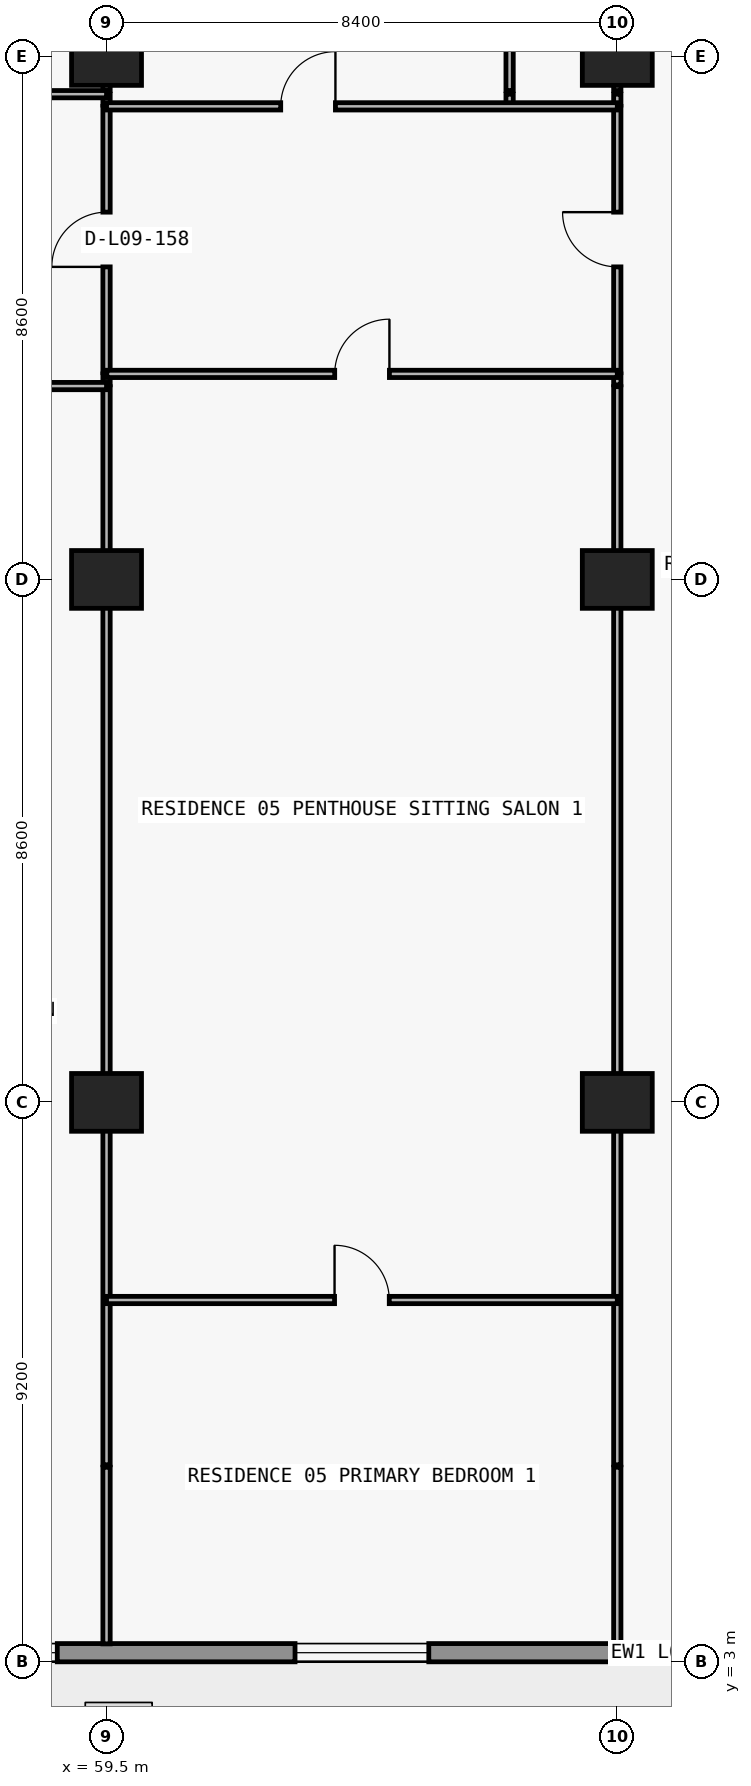
"""IFC4 building model, lengths in metres.
Left out: names, types, materials, properties, quantities, classifications, styles, units other than length and angle.
Written with IfcOpenShell. Run it as: python <this file> out.ifc"""

import sys

from ifc_helpers import new_model, si_unit, direction, frame, frame_2d, origin, origin_2d, place, context, subcontext, project, spatial, rectangle, extrude, element, fill, save


model = new_model("IFC4")
c1 = context("Model", 3, precision=1e-05, world=origin(), true_north=direction((0.0, 1.0)))
c2 = subcontext(c1, "Body", "Model", "MODEL_VIEW")
j1 = project(units=[si_unit("LENGTHUNIT", "METRE"), si_unit("PLANEANGLEUNIT", "RADIAN")], contexts=[c1])
p1 = place(None, origin())
s1 = spatial("IfcSite", under=j1, at=p1, CompositionType="ELEMENT")
p2 = place(p1, origin())
s2 = spatial("IfcBuilding", under=s1, at=p2, CompositionType="ELEMENT")
p3 = place(p2, frame((0.0, 0.0, 39.9)))
s3 = spatial("IfcBuildingStorey", under=s2, at=p3, CompositionType="ELEMENT", Elevation=39.9)
for number, where, z_axis, x_axis in (
    (1, (59.5, 12.2, 0.0), (0.0, 0.0, 1.0), (1.0, 0.0, 0.0)),
    (2, (67.9, 12.2, 0.0), (0.0, 0.0, 1.0), (1.0, 0.0, 0.0)),
    (3, (59.5, 20.8, 0.0), (0.0, 0.0, 1.0), (1.0, 0.0, 0.0)),
    (4, (67.9, 20.8, 0.0), (0.0, 0.0, 1.0), (1.0, 0.0, 0.0)),
    (5, (59.5, 29.4, 0.0), (0.0, 0.0, 1.0), (1.0, 0.0, 0.0)),
    (6, (67.9, 29.4, 0.0), (0.0, 0.0, 1.0), (1.0, 0.0, 0.0)),
):
    element("IfcColumn", number, at=place(p3, frame(where, z_axis=z_axis, x_axis=x_axis)), inside=s3, PredefinedType="COLUMN", context=c2, shape_type="SweptSolid", body=[
        extrude(rectangle(XDim=1.15, YDim=0.95, at=origin_2d()), origin(), (0.0, 0.0, 1.0), 3.05),
    ])
p4 = place(p3, frame((72.7, 3.15, 0.0), z_axis=(0.0, 0.0, 1.0), x_axis=(-1.0, 0.0, 0.0)))
e7 = element("IfcWall", 7, at=p4, inside=s3, PredefinedType="STANDARD", context=c2, shape_type="SweptSolid", body=[
    extrude(rectangle(XDim=67.6, YDim=0.3, at=frame_2d((33.8, 0.0))), origin(), (0.0, 0.0, 1.0), 3.05),
])
p5 = place(p4, frame((59.89, 0.0, 0.0)))
e8 = element("IfcOpeningElement", 8, at=p5, cuts=e7, PredefinedType="OPENING", context=c2, shape_type="SweptSolid", body=[
    extrude(rectangle(XDim=2.0, YDim=2.3, at=frame_2d((1.0, 1.15))), frame((0.0, 0.16, 0.0), z_axis=(0.0, -1.0, 0.0), x_axis=(1.0, 0.0, 0.0)), (0.0, 0.0, 1.0), 0.32),
])
p6 = place(p4, frame((55.21, 0.0, 0.65)))
e9 = element("IfcOpeningElement", 9, at=p6, cuts=e7, PredefinedType="OPENING", context=c2, shape_type="SweptSolid", body=[
    extrude(rectangle(XDim=2.6, YDim=1.85, at=frame_2d((1.3, 0.925))), frame((0.0, 0.16, 0.0), z_axis=(0.0, -1.0, 0.0), x_axis=(1.0, 0.0, 0.0)), (0.0, 0.0, 1.0), 0.32),
])
p7 = place(p4, frame((49.1, 0.0, 0.85)))
e10 = element("IfcOpeningElement", 10, at=p7, cuts=e7, PredefinedType="OPENING", context=c2, shape_type="SweptSolid", body=[
    extrude(rectangle(XDim=2.2, YDim=1.55, at=frame_2d((1.1, 0.775))), frame((0.0, 0.16, 0.0), z_axis=(0.0, -1.0, 0.0), x_axis=(1.0, 0.0, 0.0)), (0.0, 0.0, 1.0), 0.32),
])
p8 = place(p4, frame((42.69, 0.0, 0.0)))
e11 = element("IfcOpeningElement", 11, at=p8, cuts=e7, PredefinedType="OPENING", context=c2, shape_type="SweptSolid", body=[
    extrude(rectangle(XDim=2.0, YDim=2.3, at=frame_2d((1.0, 1.15))), frame((0.0, 0.16, 0.0), z_axis=(0.0, -1.0, 0.0), x_axis=(1.0, 0.0, 0.0)), (0.0, 0.0, 1.0), 0.32),
])
p9 = place(p4, frame((38.59, 0.0, 0.85)))
e12 = element("IfcOpeningElement", 12, at=p9, cuts=e7, PredefinedType="OPENING", context=c2, shape_type="SweptSolid", body=[
    extrude(rectangle(XDim=1.8, YDim=1.55, at=frame_2d((0.9, 0.775))), frame((0.0, 0.16, 0.0), z_axis=(0.0, -1.0, 0.0), x_axis=(1.0, 0.0, 0.0)), (0.0, 0.0, 1.0), 0.32),
])
p10 = place(p4, frame((30.914, 0.0, 0.85)))
e13 = element("IfcOpeningElement", 13, at=p10, cuts=e7, PredefinedType="OPENING", context=c2, shape_type="SweptSolid", body=[
    extrude(rectangle(XDim=2.2, YDim=1.55, at=frame_2d((1.1, 0.775))), frame((0.0, 0.16, 0.0), z_axis=(0.0, -1.0, 0.0), x_axis=(1.0, 0.0, 0.0)), (0.0, 0.0, 1.0), 0.32),
])
p11 = place(p4, frame((26.69, 0.0, 0.0)))
e14 = element("IfcOpeningElement", 14, at=p11, cuts=e7, PredefinedType="OPENING", context=c2, shape_type="SweptSolid", body=[
    extrude(rectangle(XDim=2.0, YDim=2.3, at=frame_2d((1.0, 1.15))), frame((0.0, 0.16, 0.0), z_axis=(0.0, -1.0, 0.0), x_axis=(1.0, 0.0, 0.0)), (0.0, 0.0, 1.0), 0.32),
])
p12 = place(p4, frame((22.59, 0.0, 0.85)))
e15 = element("IfcOpeningElement", 15, at=p12, cuts=e7, PredefinedType="OPENING", context=c2, shape_type="SweptSolid", body=[
    extrude(rectangle(XDim=1.8, YDim=1.55, at=frame_2d((0.9, 0.775))), frame((0.0, 0.16, 0.0), z_axis=(0.0, -1.0, 0.0), x_axis=(1.0, 0.0, 0.0)), (0.0, 0.0, 1.0), 0.32),
])
p13 = place(p4, frame((18.69, 0.0, 0.0)))
e16 = element("IfcOpeningElement", 16, at=p13, cuts=e7, PredefinedType="OPENING", context=c2, shape_type="SweptSolid", body=[
    extrude(rectangle(XDim=2.0, YDim=2.3, at=frame_2d((1.0, 1.15))), frame((0.0, 0.16, 0.0), z_axis=(0.0, -1.0, 0.0), x_axis=(1.0, 0.0, 0.0)), (0.0, 0.0, 1.0), 0.32),
])
p14 = place(p4, frame((14.01, 0.0, 0.65)))
e17 = element("IfcOpeningElement", 17, at=p14, cuts=e7, PredefinedType="OPENING", context=c2, shape_type="SweptSolid", body=[
    extrude(rectangle(XDim=2.6, YDim=1.85, at=frame_2d((1.3, 0.925))), frame((0.0, 0.16, 0.0), z_axis=(0.0, -1.0, 0.0), x_axis=(1.0, 0.0, 0.0)), (0.0, 0.0, 1.0), 0.32),
])
p15 = place(p4, frame((7.9, 0.0, 0.85)))
e18 = element("IfcOpeningElement", 18, at=p15, cuts=e7, PredefinedType="OPENING", context=c2, shape_type="SweptSolid", body=[
    extrude(rectangle(XDim=2.2, YDim=1.55, at=frame_2d((1.1, 0.775))), frame((0.0, 0.16, 0.0), z_axis=(0.0, -1.0, 0.0), x_axis=(1.0, 0.0, 0.0)), (0.0, 0.0, 1.0), 0.32),
])
p16 = place(p3, frame((59.5, 3.295, 0.0), z_axis=(0.0, 0.0, 1.0), x_axis=(0.0, 1.0, 0.0)))
e19 = element("IfcWall", 19, at=p16, inside=s3, PredefinedType="PARTITIONING", context=c2, shape_type="SweptSolid", body=[
    extrude(rectangle(XDim=2.905, YDim=0.12, at=frame_2d((1.453, 0.0))), origin(), (0.0, 0.0, 1.0), 3.05),
])
p17 = place(p3, frame((59.5, 6.24, 0.0), z_axis=(0.0, 0.0, 1.0), x_axis=(0.0, 1.0, 0.0)))
e20 = element("IfcWall", 20, at=p17, inside=s3, PredefinedType="PARTITIONING", context=c2, shape_type="SweptSolid", body=[
    extrude(rectangle(XDim=17.73, YDim=0.12, at=frame_2d((8.865, 0.0))), origin(), (0.0, 0.0, 1.0), 2.11),
])
p18 = place(p3, frame((59.5, 24.0, 0.0), z_axis=(0.0, 0.0, 1.0), x_axis=(0.0, 1.0, 0.0)))
e21 = element("IfcWall", 21, at=p18, inside=s3, PredefinedType="PARTITIONING", context=c2, shape_type="SweptSolid", body=[
    extrude(rectangle(XDim=0.18, YDim=0.12, at=frame_2d((0.09, 0.0))), origin(), (0.0, 0.0, 1.0), 2.11),
])
p19 = place(p3, frame((59.5, 24.2, 0.0), z_axis=(0.0, 0.0, 1.0), x_axis=(0.0, 1.0, 0.0)))
e22 = element("IfcWall", 22, at=p19, inside=s3, PredefinedType="PARTITIONING", context=c2, shape_type="SweptSolid", body=[
    extrude(rectangle(XDim=4.38, YDim=0.12, at=frame_2d((2.19, 0.0))), origin(), (0.0, 0.0, 1.0), 2.11),
])
p20 = place(p19, frame((1.74, 0.0, 0.0)))
e23 = element("IfcOpeningElement", 23, at=p20, cuts=e22, PredefinedType="OPENING", context=c2, shape_type="SweptSolid", body=[
    extrude(rectangle(XDim=0.9, YDim=2.06, at=frame_2d((0.45, 1.03))), frame((0.0, 0.07, 0.0), z_axis=(0.0, -1.0, 0.0), x_axis=(1.0, 0.0, 0.0)), (0.0, 0.0, 1.0), 0.14),
])
p21 = place(p3, frame((59.5, 28.6, 0.0), z_axis=(0.0, 0.0, 1.0), x_axis=(0.0, 1.0, 0.0)))
e24 = element("IfcWall", 24, at=p21, inside=s3, PredefinedType="PARTITIONING", context=c2, shape_type="SweptSolid", body=[
    extrude(rectangle(XDim=0.18, YDim=0.12, at=frame_2d((0.09, 0.0))), origin(), (0.0, 0.0, 1.0), 2.11),
])
p22 = place(p3, frame((59.5, 28.84, 0.0), z_axis=(0.0, 0.0, 1.0), x_axis=(0.0, 1.0, 0.0)))
e25 = element("IfcWall", 25, at=p22, inside=s3, PredefinedType="PARTITIONING", context=c2, shape_type="SweptSolid", body=[
    extrude(rectangle(XDim=5.16, YDim=0.12, at=frame_2d((2.58, 0.0))), origin(), (0.0, 0.0, 1.0), 2.11),
])
p23 = place(p3, frame((66.129, 28.6, 0.0), z_axis=(0.0, 0.0, 1.0), x_axis=(0.0, 1.0, 0.0)))
e26 = element("IfcWall", 26, at=p23, inside=s3, PredefinedType="PARTITIONING", context=c2, shape_type="SweptSolid", body=[
    extrude(rectangle(XDim=0.18, YDim=0.12, at=frame_2d((0.09, 0.0))), origin(), (0.0, 0.0, 1.0), 3.05),
])
p24 = place(p3, frame((66.129, 28.84, 0.0), z_axis=(0.0, 0.0, 1.0), x_axis=(0.0, 1.0, 0.0)))
e27 = element("IfcWall", 27, at=p24, inside=s3, PredefinedType="PARTITIONING", context=c2, shape_type="SweptSolid", body=[
    extrude(rectangle(XDim=5.16, YDim=0.12, at=frame_2d((2.58, 0.0))), origin(), (0.0, 0.0, 1.0), 3.05),
])
p25 = place(p24, frame((2.155, 0.0, 0.0)))
e28 = element("IfcOpeningElement", 28, at=p25, cuts=e27, PredefinedType="OPENING", context=c2, shape_type="SweptSolid", body=[
    extrude(rectangle(XDim=0.85, YDim=2.1, at=frame_2d((0.425, 1.05))), frame((0.0, 0.07, 0.0), z_axis=(0.0, -1.0, 0.0), x_axis=(1.0, 0.0, 0.0)), (0.0, 0.0, 1.0), 0.14),
])
p26 = place(p3, frame((67.9, 3.295, 0.0), z_axis=(0.0, 0.0, 1.0), x_axis=(0.0, 1.0, 0.0)))
e29 = element("IfcWall", 29, at=p26, inside=s3, PredefinedType="PARTITIONING", context=c2, shape_type="SweptSolid", body=[
    extrude(rectangle(XDim=2.905, YDim=0.12, at=frame_2d((1.453, 0.0))), origin(), (0.0, 0.0, 1.0), 3.05),
])
p27 = place(p3, frame((67.9, 6.24, 0.0), z_axis=(0.0, 0.0, 1.0), x_axis=(0.0, 1.0, 0.0)))
e30 = element("IfcWall", 30, at=p27, inside=s3, PredefinedType="PARTITIONING", context=c2, shape_type="SweptSolid", body=[
    extrude(rectangle(XDim=17.73, YDim=0.12, at=frame_2d((8.865, 0.0))), origin(), (0.0, 0.0, 1.0), 2.11),
])
p28 = place(p3, frame((67.9, 24.0, 0.0), z_axis=(0.0, 0.0, 1.0), x_axis=(0.0, 1.0, 0.0)))
e31 = element("IfcWall", 31, at=p28, inside=s3, PredefinedType="PARTITIONING", context=c2, shape_type="SweptSolid", body=[
    extrude(rectangle(XDim=0.18, YDim=0.12, at=frame_2d((0.09, 0.0))), origin(), (0.0, 0.0, 1.0), 2.11),
])
p29 = place(p3, frame((67.9, 24.2, 0.0), z_axis=(0.0, 0.0, 1.0), x_axis=(0.0, 1.0, 0.0)))
e32 = element("IfcWall", 32, at=p29, inside=s3, PredefinedType="PARTITIONING", context=c2, shape_type="SweptSolid", body=[
    extrude(rectangle(XDim=4.38, YDim=0.12, at=frame_2d((2.19, 0.0))), origin(), (0.0, 0.0, 1.0), 2.11),
])
p30 = place(p29, frame((1.74, 0.0, 0.0)))
e33 = element("IfcOpeningElement", 33, at=p30, cuts=e32, PredefinedType="OPENING", context=c2, shape_type="SweptSolid", body=[
    extrude(rectangle(XDim=0.9, YDim=2.06, at=frame_2d((0.45, 1.03))), frame((0.0, 0.07, 0.0), z_axis=(0.0, -1.0, 0.0), x_axis=(1.0, 0.0, 0.0)), (0.0, 0.0, 1.0), 0.14),
])
p31 = place(p3, frame((67.9, 28.6, 0.0), z_axis=(0.0, 0.0, 1.0), x_axis=(0.0, 1.0, 0.0)))
e34 = element("IfcWall", 34, at=p31, inside=s3, PredefinedType="PARTITIONING", context=c2, shape_type="SweptSolid", body=[
    extrude(rectangle(XDim=0.18, YDim=0.12, at=frame_2d((0.09, 0.0))), origin(), (0.0, 0.0, 1.0), 2.11),
])
p32 = place(p3, frame((67.9, 28.84, 0.0), z_axis=(0.0, 0.0, 1.0), x_axis=(0.0, 1.0, 0.0)))
e35 = element("IfcWall", 35, at=p32, inside=s3, PredefinedType="PARTITIONING", context=c2, shape_type="SweptSolid", body=[
    extrude(rectangle(XDim=5.16, YDim=0.12, at=frame_2d((2.58, 0.0))), origin(), (0.0, 0.0, 1.0), 2.11),
])
p33 = place(p3, frame((59.5, 8.95, 0.0), z_axis=(0.0, 0.0, 1.0), x_axis=(1.0, 0.0, 0.0)))
e36 = element("IfcWall", 36, at=p33, inside=s3, PredefinedType="PARTITIONING", context=c2, shape_type="SweptSolid", body=[
    extrude(rectangle(XDim=8.4, YDim=0.12, at=frame_2d((4.2, 0.0))), origin(), (0.0, 0.0, 1.0), 3.05),
])
p34 = place(p33, frame((3.75, 0.0, 0.0)))
e37 = element("IfcOpeningElement", 37, at=p34, cuts=e36, PredefinedType="OPENING", context=c2, shape_type="SweptSolid", body=[
    extrude(rectangle(XDim=0.9, YDim=2.15, at=frame_2d((0.45, 1.075))), frame((0.0, 0.07, 0.0), z_axis=(0.0, -1.0, 0.0), x_axis=(1.0, 0.0, 0.0)), (0.0, 0.0, 1.0), 0.14),
])
p35 = place(p3, frame((51.37, 23.98, 0.0), z_axis=(0.0, 0.0, 1.0), x_axis=(1.0, 0.0, 0.0)))
e38 = element("IfcWall", 38, at=p35, inside=s3, PredefinedType="PARTITIONING", context=c2, shape_type="SweptSolid", body=[
    extrude(rectangle(XDim=8.13, YDim=0.12, at=frame_2d((4.065, 0.0))), origin(), (0.0, 0.0, 1.0), 3.05),
])
p36 = place(p35, frame((1.305, 0.0, 0.0)))
e39 = element("IfcOpeningElement", 39, at=p36, cuts=e38, PredefinedType="OPENING", context=c2, shape_type="SweptSolid", body=[
    extrude(rectangle(XDim=0.9, YDim=2.15, at=frame_2d((0.45, 1.075))), frame((0.0, 0.07, 0.0), z_axis=(0.0, -1.0, 0.0), x_axis=(1.0, 0.0, 0.0)), (0.0, 0.0, 1.0), 0.14),
])
p37 = place(p3, frame((59.505, 24.18, 0.0), z_axis=(0.0, 0.0, 1.0), x_axis=(1.0, 0.0, 0.0)))
e40 = element("IfcWall", 40, at=p37, inside=s3, PredefinedType="PARTITIONING", context=c2, shape_type="SweptSolid", body=[
    extrude(rectangle(XDim=8.395, YDim=0.12, at=frame_2d((4.198, 0.0))), origin(), (0.0, 0.0, 1.0), 3.05),
])
p38 = place(p37, frame((3.748, 0.0, 0.0)))
e41 = element("IfcOpeningElement", 41, at=p38, cuts=e40, PredefinedType="OPENING", context=c2, shape_type="SweptSolid", body=[
    extrude(rectangle(XDim=0.9, YDim=2.15, at=frame_2d((0.45, 1.075))), frame((0.0, 0.07, 0.0), z_axis=(0.0, -1.0, 0.0), x_axis=(1.0, 0.0, 0.0)), (0.0, 0.0, 1.0), 0.14),
])
p39 = place(p3, frame((59.5, 28.58, 0.0), z_axis=(0.0, 0.0, 1.0), x_axis=(1.0, 0.0, 0.0)))
e42 = element("IfcWall", 42, at=p39, inside=s3, PredefinedType="PARTITIONING", context=c2, shape_type="SweptSolid", body=[
    extrude(rectangle(XDim=8.4, YDim=0.12, at=frame_2d((4.2, 0.0))), origin(), (0.0, 0.0, 1.0), 3.05),
])
p40 = place(p39, frame((2.865, 0.0, 0.0)))
e43 = element("IfcOpeningElement", 43, at=p40, cuts=e42, PredefinedType="OPENING", context=c2, shape_type="SweptSolid", body=[
    extrude(rectangle(XDim=0.9, YDim=2.15, at=frame_2d((0.45, 1.075))), frame((0.0, 0.07, 0.0), z_axis=(0.0, -1.0, 0.0), x_axis=(1.0, 0.0, 0.0)), (0.0, 0.0, 1.0), 0.14),
])
p41 = place(p3, frame((51.37, 28.78, 0.0), z_axis=(0.0, 0.0, 1.0), x_axis=(1.0, 0.0, 0.0)))
e44 = element("IfcWall", 44, at=p41, inside=s3, PredefinedType="PARTITIONING", context=c2, shape_type="SweptSolid", body=[
    extrude(rectangle(XDim=8.13, YDim=0.12, at=frame_2d((4.065, 0.0))), origin(), (0.0, 0.0, 1.0), 3.05),
])
p42 = place(p41, frame((1.305, 0.0, 0.0)))
e45 = element("IfcOpeningElement", 45, at=p42, cuts=e44, PredefinedType="OPENING", context=c2, shape_type="SweptSolid", body=[
    extrude(rectangle(XDim=0.9, YDim=2.15, at=frame_2d((0.45, 1.075))), frame((0.0, 0.07, 0.0), z_axis=(0.0, -1.0, 0.0), x_axis=(1.0, 0.0, 0.0)), (0.0, 0.0, 1.0), 0.14),
])
p43 = place(p14, origin())
e46 = element("IfcWindow", 46, at=p43, inside=s3, PartitioningType="SINGLE_PANEL", PredefinedType="WINDOW", context=c2, shape_type="SweptSolid", body=[
    extrude(rectangle(XDim=2.6, YDim=1.85, at=frame_2d((1.3, 0.925))), frame((0.0, 0.03, 0.0), z_axis=(0.0, -1.0, 0.0), x_axis=(1.0, 0.0, 0.0)), (0.0, 0.0, 1.0), 0.06),
])
fill(e17, e46)
p44 = place(p15, origin())
e47 = element("IfcWindow", 47, at=p44, inside=s3, PartitioningType="SINGLE_PANEL", PredefinedType="WINDOW", context=c2, shape_type="SweptSolid", body=[
    extrude(rectangle(XDim=2.2, YDim=1.55, at=frame_2d((1.1, 0.775))), frame((0.0, 0.03, 0.0), z_axis=(0.0, -1.0, 0.0), x_axis=(1.0, 0.0, 0.0)), (0.0, 0.0, 1.0), 0.06),
])
fill(e18, e47)
p45 = place(p20, origin())
e48 = element("IfcDoor", 48, at=p45, inside=s3, OperationType="SINGLE_SWING_LEFT", PredefinedType="DOOR", context=c2, shape_type="SweptSolid", body=[
    extrude(rectangle(XDim=0.9, YDim=2.06, at=frame_2d((0.45, 1.03))), frame((0.0, 0.025, 0.0), z_axis=(0.0, -1.0, 0.0), x_axis=(1.0, 0.0, 0.0)), (0.0, 0.0, 1.0), 0.05),
])
fill(e23, e48)
p46 = place(p40, origin())
e49 = element("IfcDoor", 49, at=p46, inside=s3, OperationType="SINGLE_SWING_RIGHT", PredefinedType="DOOR", context=c2, shape_type="SweptSolid", body=[
    extrude(rectangle(XDim=0.9, YDim=2.15, at=frame_2d((0.45, 1.075))), frame((0.0, 0.025, 0.0), z_axis=(0.0, -1.0, 0.0), x_axis=(1.0, 0.0, 0.0)), (0.0, 0.0, 1.0), 0.05),
])
fill(e43, e49)
p47 = place(p38, origin())
e50 = element("IfcDoor", 50, at=p47, inside=s3, OperationType="SINGLE_SWING_RIGHT", PredefinedType="DOOR", context=c2, shape_type="SweptSolid", body=[
    extrude(rectangle(XDim=0.9, YDim=2.15, at=frame_2d((0.45, 1.075))), frame((0.0, 0.025, 0.0), z_axis=(0.0, -1.0, 0.0), x_axis=(1.0, 0.0, 0.0)), (0.0, 0.0, 1.0), 0.05),
])
fill(e41, e50)
p48 = place(p34, origin())
e51 = element("IfcDoor", 51, at=p48, inside=s3, OperationType="SINGLE_SWING_LEFT", PredefinedType="DOOR", context=c2, shape_type="SweptSolid", body=[
    extrude(rectangle(XDim=0.9, YDim=2.15, at=frame_2d((0.45, 1.075))), frame((0.0, 0.025, 0.0), z_axis=(0.0, -1.0, 0.0), x_axis=(1.0, 0.0, 0.0)), (0.0, 0.0, 1.0), 0.05),
])
fill(e37, e51)
p49 = place(p30, origin())
e52 = element("IfcDoor", 52, at=p49, inside=s3, OperationType="SINGLE_SWING_RIGHT", PredefinedType="DOOR", context=c2, shape_type="SweptSolid", body=[
    extrude(rectangle(XDim=0.9, YDim=2.06, at=frame_2d((0.45, 1.03))), frame((0.0, 0.025, 0.0), z_axis=(0.0, -1.0, 0.0), x_axis=(1.0, 0.0, 0.0)), (0.0, 0.0, 1.0), 0.05),
])
fill(e33, e52)
save(model, sys.argv[1])
